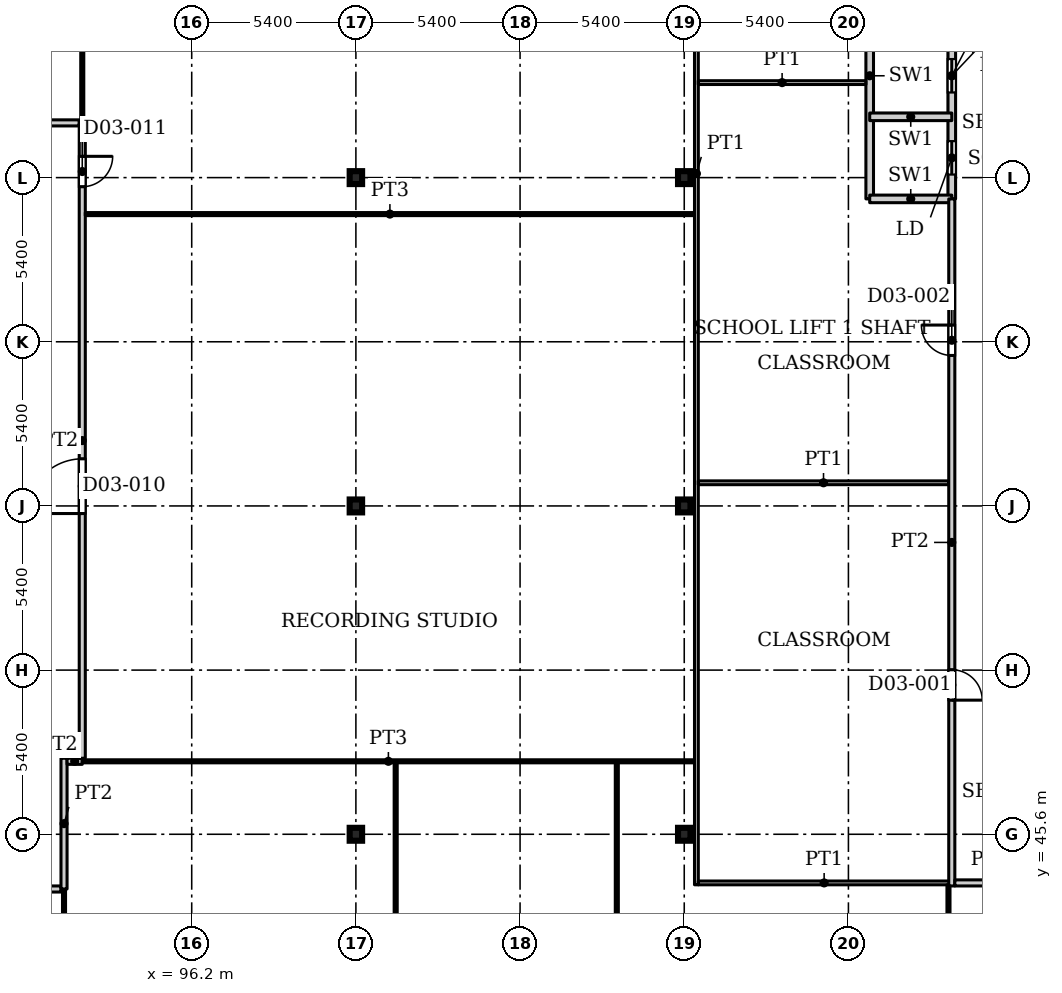
"""IFC4 building model, lengths in metres.
Left out: names, types, materials, properties, quantities, classifications, styles, units other than length and angle.
Written with IfcOpenShell. Run it as: python <this file> out.ifc"""

import sys

from ifc_helpers import new_model, si_unit, direction, frame, frame_2d, origin, origin_2d, place, context, subcontext, project, spatial, rectangle, i_section, extrude, source, transform, mapped, element, fill, save


model = new_model("IFC4")
c1 = context("Model", 3, precision=1e-05, world=origin(), true_north=direction((0.0, 1.0)))
c2 = subcontext(c1, "Body", "Model", "MODEL_VIEW")
j1 = project(units=[si_unit("LENGTHUNIT", "METRE"), si_unit("PLANEANGLEUNIT", "RADIAN")], contexts=[c1])
p1 = place(None, origin())
s1 = spatial("IfcSite", under=j1, at=p1, CompositionType="ELEMENT")
p2 = place(p1, origin())
s2 = spatial("IfcBuilding", under=s1, at=p2, CompositionType="ELEMENT")
p3 = place(p2, frame((0.0, 0.0, 17.0)))
s3 = spatial("IfcBuildingStorey", under=s2, at=p3, CompositionType="ELEMENT", Elevation=17.0)
for number, where, z_axis, x_axis in (
    (1, (101.6, 45.6, 0.0), (0.0, 0.0, 1.0), (1.0, 0.0, 0.0)),
    (2, (112.4, 45.6, 0.0), (0.0, 0.0, 1.0), (1.0, 0.0, 0.0)),
    (3, (101.6, 56.4, 0.0), (0.0, 0.0, 1.0), (1.0, 0.0, 0.0)),
    (4, (112.4, 56.4, 0.0), (0.0, 0.0, 1.0), (1.0, 0.0, 0.0)),
    (5, (101.6, 67.2, 0.0), (0.0, 0.0, 1.0), (1.0, 0.0, 0.0)),
    (6, (112.4, 67.2, 0.0), (0.0, 0.0, 1.0), (1.0, 0.0, 0.0)),
):
    element("IfcColumn", number, at=place(p3, frame(where, z_axis=z_axis, x_axis=x_axis)), inside=s3, PredefinedType="COLUMN", context=c2, shape_type="SweptSolid", body=[
        extrude(i_section(OverallWidth=0.409, OverallDepth=0.425, WebThickness=0.033, FlangeThickness=0.052, FilletRadius=0.013, at=origin_2d()), origin(), (0.0, 0.0, 1.0), 4.5),
    ])
p4 = place(p3, frame((118.5, 66.5, 0.0), z_axis=(0.0, 0.0, 1.0), x_axis=(0.0, 1.0, 0.0)))
e7 = element("IfcWall", 7, at=p4, inside=s3, PredefinedType="PARTITIONING", context=c2, shape_type="SweptSolid", body=[
    extrude(rectangle(XDim=8.1, YDim=0.25, at=frame_2d((4.05, 0.0))), origin(), (0.0, 0.0, 1.0), 4.5),
])
p5 = place(p3, frame((121.2, 66.5, 0.0), z_axis=(0.0, 0.0, 1.0), x_axis=(0.0, 1.0, 0.0)))
e8 = element("IfcWall", 8, at=p5, inside=s3, PredefinedType="PARTITIONING", context=c2, shape_type="SweptSolid", body=[
    extrude(rectangle(XDim=8.1, YDim=0.25, at=frame_2d((4.05, 0.0))), origin(), (0.0, 0.0, 1.0), 4.5),
])
p6 = place(p5, frame((0.8, 0.0, 0.0)))
e9 = element("IfcOpeningElement", 9, at=p6, cuts=e8, PredefinedType="OPENING", context=c2, shape_type="SweptSolid", body=[
    extrude(rectangle(XDim=1.1, YDim=2.2, at=frame_2d((0.55, 1.1))), frame((0.0, 0.135, 0.0), z_axis=(0.0, -1.0, 0.0), x_axis=(1.0, 0.0, 0.0)), (0.0, 0.0, 1.0), 0.27),
])
p7 = place(p5, frame((3.5, 0.0, 0.0)))
e10 = element("IfcOpeningElement", 10, at=p7, cuts=e8, PredefinedType="OPENING", context=c2, shape_type="SweptSolid", body=[
    extrude(rectangle(XDim=1.1, YDim=2.2, at=frame_2d((0.55, 1.1))), frame((0.0, 0.135, 0.0), z_axis=(0.0, -1.0, 0.0), x_axis=(1.0, 0.0, 0.0)), (0.0, 0.0, 1.0), 0.27),
])
p8 = place(p5, frame((6.2, 0.0, 0.0)))
e11 = element("IfcOpeningElement", 11, at=p8, cuts=e8, PredefinedType="OPENING", context=c2, shape_type="SweptSolid", body=[
    extrude(rectangle(XDim=1.1, YDim=2.2, at=frame_2d((0.55, 1.1))), frame((0.0, 0.135, 0.0), z_axis=(0.0, -1.0, 0.0), x_axis=(1.0, 0.0, 0.0)), (0.0, 0.0, 1.0), 0.27),
])
for number, where, z_axis, x_axis in (
    (12, (118.5, 66.5, 0.0), (0.0, 0.0, 1.0), (1.0, 0.0, 0.0)),
    (13, (118.5, 69.2, 0.0), (0.0, 0.0, 1.0), (1.0, 0.0, 0.0)),
):
    element("IfcWall", number, at=place(p3, frame(where, z_axis=z_axis, x_axis=x_axis)), inside=s3, PredefinedType="PARTITIONING", context=c2, shape_type="SweptSolid", body=[
        extrude(rectangle(XDim=2.7, YDim=0.25, at=frame_2d((1.35, 0.0))), origin(), (0.0, 0.0, 1.0), 4.5),
    ])
p9 = place(p3, frame((67.5, 43.8, 0.0), z_axis=(0.0, 0.0, 1.0), x_axis=(1.0, 0.0, 0.0)))
e14 = element("IfcWall", 14, at=p9, inside=s3, PredefinedType="PARTITIONING", context=c2, shape_type="SweptSolid", body=[
    extrude(rectangle(XDim=24.4, YDim=0.2, at=frame_2d((12.2, 0.0))), origin(), (0.0, 0.0, 1.0), 4.18),
])
p10 = place(p9, frame((11.3, 0.0, 0.0)))
e15 = element("IfcOpeningElement", 15, at=p10, cuts=e14, PredefinedType="OPENING", context=c2, shape_type="SweptSolid", body=[
    extrude(rectangle(XDim=1.8, YDim=2.1, at=frame_2d((0.9, 1.05))), frame((0.0, 0.11, 0.0), z_axis=(0.0, -1.0, 0.0), x_axis=(1.0, 0.0, 0.0)), (0.0, 0.0, 1.0), 0.22),
])
p11 = place(p3, frame((67.5, 69.0, 0.0), z_axis=(0.0, 0.0, 1.0), x_axis=(1.0, 0.0, 0.0)))
e16 = element("IfcWall", 16, at=p11, inside=s3, PredefinedType="PARTITIONING", context=c2, shape_type="SweptSolid", body=[
    extrude(rectangle(XDim=25.0, YDim=0.2, at=frame_2d((12.5, 0.0))), origin(), (0.0, 0.0, 1.0), 4.18),
])
p12 = place(p11, frame((11.4, 0.0, 0.0)))
e17 = element("IfcOpeningElement", 17, at=p12, cuts=e16, PredefinedType="OPENING", context=c2, shape_type="SweptSolid", body=[
    extrude(rectangle(XDim=2.0, YDim=2.1, at=frame_2d((1.0, 1.05))), frame((0.0, 0.11, 0.0), z_axis=(0.0, -1.0, 0.0), x_axis=(1.0, 0.0, 0.0)), (0.0, 0.0, 1.0), 0.22),
])
p13 = place(p11, frame((4.3, 0.0, 0.0)))
e18 = element("IfcOpeningElement", 18, at=p13, cuts=e16, PredefinedType="OPENING", context=c2, shape_type="SweptSolid", body=[
    extrude(rectangle(XDim=1.8, YDim=2.1, at=frame_2d((0.9, 1.05))), frame((0.0, 0.11, 0.0), z_axis=(0.0, -1.0, 0.0), x_axis=(1.0, 0.0, 0.0)), (0.0, 0.0, 1.0), 0.22),
])
p14 = place(p11, frame((18.9, 0.0, 0.0)))
e19 = element("IfcOpeningElement", 19, at=p14, cuts=e16, PredefinedType="OPENING", context=c2, shape_type="SweptSolid", body=[
    extrude(rectangle(XDim=1.8, YDim=2.1, at=frame_2d((0.9, 1.05))), frame((0.0, 0.11, 0.0), z_axis=(0.0, -1.0, 0.0), x_axis=(1.0, 0.0, 0.0)), (0.0, 0.0, 1.0), 0.22),
])
p15 = place(p3, frame((92.0, 35.2, 0.0), z_axis=(0.0, 0.0, 1.0), x_axis=(0.0, 1.0, 0.0)))
e20 = element("IfcWall", 20, at=p15, inside=s3, PredefinedType="PARTITIONING", context=c2, shape_type="SweptSolid", body=[
    extrude(rectangle(XDim=8.6, YDim=0.1, at=frame_2d((4.3, 0.0))), origin(), (0.0, 0.0, 1.0), 4.18),
])
p16 = place(p3, frame((92.0, 43.8, 0.0), z_axis=(0.0, 0.0, 1.0), x_axis=(0.0, 1.0, 0.0)))
e21 = element("IfcWall", 21, at=p16, inside=s3, PredefinedType="PARTITIONING", context=c2, shape_type="SweptSolid", body=[
    extrude(rectangle(XDim=4.3, YDim=0.2, at=frame_2d((2.15, 0.0))), origin(), (0.0, 0.0, 1.0), 4.18),
])
p17 = place(p3, frame((92.1, 48.0, 0.0), z_axis=(0.0, 0.0, 1.0), x_axis=(1.0, 0.0, 0.0)))
e22 = element("IfcWall", 22, at=p17, inside=s3, PredefinedType="PARTITIONING", context=c2, shape_type="SweptSolid", body=[
    extrude(rectangle(XDim=0.5, YDim=0.2, at=frame_2d((0.25, 0.0))), origin(), (0.0, 0.0, 1.0), 4.18),
])
p18 = place(p3, frame((92.6, 48.0, 0.0), z_axis=(0.0, 0.0, 1.0), x_axis=(1.0, 0.0, 0.0)))
e23 = element("IfcWall", 23, at=p18, inside=s3, PredefinedType="PARTITIONING", context=c2, shape_type="SweptSolid", body=[
    extrude(rectangle(XDim=20.138, YDim=0.1, at=frame_2d((10.069, 0.0))), origin(), (0.0, 0.0, 1.0), 4.18),
])
p19 = place(p3, frame((92.6, 48.1, 0.0), z_axis=(0.0, 0.0, 1.0), x_axis=(0.0, 1.0, 0.0)))
e24 = element("IfcWall", 24, at=p19, inside=s3, PredefinedType="PARTITIONING", context=c2, shape_type="SweptSolid", body=[
    extrude(rectangle(XDim=20.9, YDim=0.2, at=frame_2d((10.45, 0.0))), origin(), (0.0, 0.0, 1.0), 4.18),
])
p20 = place(p19, frame((8.05, 0.0, 0.0)))
e25 = element("IfcOpeningElement", 25, at=p20, cuts=e24, PredefinedType="OPENING", context=c2, shape_type="SweptSolid", body=[
    extrude(rectangle(XDim=1.8, YDim=2.1, at=frame_2d((0.9, 1.05))), frame((0.0, 0.11, 0.0), z_axis=(0.0, -1.0, 0.0), x_axis=(1.0, 0.0, 0.0)), (0.0, 0.0, 1.0), 0.22),
])
p21 = place(p19, frame((18.8, 0.0, 0.0)))
e26 = element("IfcOpeningElement", 26, at=p21, cuts=e24, PredefinedType="OPENING", context=c2, shape_type="SweptSolid", body=[
    extrude(rectangle(XDim=1.0, YDim=2.1, at=frame_2d((0.5, 1.05))), frame((0.0, 0.11, 0.0), z_axis=(0.0, -1.0, 0.0), x_axis=(1.0, 0.0, 0.0)), (0.0, 0.0, 1.0), 0.22),
])
p22 = place(p3, frame((92.6, 69.0, 0.0), z_axis=(0.0, 0.0, 1.0), x_axis=(0.0, 1.0, 0.0)))
e27 = element("IfcWall", 27, at=p22, inside=s3, PredefinedType="PARTITIONING", context=c2, shape_type="SweptSolid", body=[
    extrude(rectangle(XDim=21.738, YDim=0.1, at=frame_2d((10.869, 0.0))), origin(), (0.0, 0.0, 1.0), 4.18),
])
p23 = place(p3, frame((92.7, 66.0, 0.0), z_axis=(0.0, 0.0, 1.0), x_axis=(1.0, 0.0, 0.0)))
e28 = element("IfcWall", 28, at=p23, inside=s3, PredefinedType="PARTITIONING", context=c2, shape_type="SweptSolid", body=[
    extrude(rectangle(XDim=20.038, YDim=0.1, at=frame_2d((10.019, 0.0))), origin(), (0.0, 0.0, 1.0), 4.18),
])
for number, where, z_axis, x_axis in (
    (29, (102.909, 35.3, 0.0), (0.0, 0.0, 1.0), (0.0, 1.0, 0.0)),
    (30, (110.182, 35.3, 0.0), (0.0, 0.0, 1.0), (0.0, 1.0, 0.0)),
):
    element("IfcWall", number, at=place(p3, frame(where, z_axis=z_axis, x_axis=x_axis)), inside=s3, PredefinedType="PARTITIONING", context=c2, shape_type="SweptSolid", body=[
        extrude(rectangle(XDim=12.65, YDim=0.1, at=frame_2d((6.325, 0.0))), origin(), (0.0, 0.0, 1.0), 4.18),
    ])
p24 = place(p3, frame((112.8, 43.938, 0.0), z_axis=(0.0, 0.0, 1.0), x_axis=(0.0, 1.0, 0.0)))
e31 = element("IfcWall", 31, at=p24, inside=s3, PredefinedType="PARTITIONING", context=c2, shape_type="SweptSolid", body=[
    extrude(rectangle(XDim=46.787, YDim=0.125, at=frame_2d((23.394, 0.0))), origin(), (0.0, 0.0, 1.0), 4.18),
])
p25 = place(p3, frame((112.862, 44.0, 0.0), z_axis=(0.0, 0.0, 1.0), x_axis=(1.0, 0.0, 0.0)))
e32 = element("IfcWall", 32, at=p25, inside=s3, PredefinedType="PARTITIONING", context=c2, shape_type="SweptSolid", body=[
    extrude(rectangle(XDim=8.279, YDim=0.125, at=frame_2d((4.14, 0.0))), origin(), (0.0, 0.0, 1.0), 4.18),
])
p26 = place(p3, frame((112.862, 57.162, 0.0), z_axis=(0.0, 0.0, 1.0), x_axis=(1.0, 0.0, 0.0)))
e33 = element("IfcWall", 33, at=p26, inside=s3, PredefinedType="PARTITIONING", context=c2, shape_type="SweptSolid", body=[
    extrude(rectangle(XDim=8.238, YDim=0.125, at=frame_2d((4.119, 0.0))), origin(), (0.0, 0.0, 1.0), 4.18),
])
p27 = place(p3, frame((112.862, 70.325, 0.0), z_axis=(0.0, 0.0, 1.0), x_axis=(1.0, 0.0, 0.0)))
e34 = element("IfcWall", 34, at=p27, inside=s3, PredefinedType="PARTITIONING", context=c2, shape_type="SweptSolid", body=[
    extrude(rectangle(XDim=5.514, YDim=0.125, at=frame_2d((2.757, 0.0))), origin(), (0.0, 0.0, 1.0), 4.18),
])
p28 = place(p3, frame((121.091, 35.3, 0.0), z_axis=(0.0, 0.0, 1.0), x_axis=(0.0, 1.0, 0.0)))
e35 = element("IfcWall", 35, at=p28, inside=s3, PredefinedType="PARTITIONING", context=c2, shape_type="SweptSolid", body=[
    extrude(rectangle(XDim=8.638, YDim=0.1, at=frame_2d((4.319, 0.0))), origin(), (0.0, 0.0, 1.0), 4.18),
])
p29 = place(p3, frame((121.2, 43.9, 0.0), z_axis=(0.0, 0.0, 1.0), x_axis=(0.0, 1.0, 0.0)))
e36 = element("IfcWall", 36, at=p29, inside=s3, PredefinedType="PARTITIONING", context=c2, shape_type="SweptSolid", body=[
    extrude(rectangle(XDim=22.6, YDim=0.2, at=frame_2d((11.3, 0.0))), origin(), (0.0, 0.0, 1.0), 4.18),
])
p30 = place(p29, frame((6.112, 0.0, 0.0)))
e37 = element("IfcOpeningElement", 37, at=p30, cuts=e36, PredefinedType="OPENING", context=c2, shape_type="SweptSolid", body=[
    extrude(rectangle(XDim=1.0, YDim=2.1, at=frame_2d((0.5, 1.05))), frame((0.0, 0.11, 0.0), z_axis=(0.0, -1.0, 0.0), x_axis=(1.0, 0.0, 0.0)), (0.0, 0.0, 1.0), 0.22),
])
p31 = place(p29, frame((17.45, 0.0, 0.0)))
e38 = element("IfcOpeningElement", 38, at=p31, cuts=e36, PredefinedType="OPENING", context=c2, shape_type="SweptSolid", body=[
    extrude(rectangle(XDim=1.0, YDim=2.1, at=frame_2d((0.5, 1.05))), frame((0.0, 0.11, 0.0), z_axis=(0.0, -1.0, 0.0), x_axis=(1.0, 0.0, 0.0)), (0.0, 0.0, 1.0), 0.22),
])
p32 = place(p3, frame((121.3, 44.0, 0.0), z_axis=(0.0, 0.0, 1.0), x_axis=(1.0, 0.0, 0.0)))
e39 = element("IfcWall", 39, at=p32, inside=s3, PredefinedType="PARTITIONING", context=c2, shape_type="SweptSolid", body=[
    extrude(rectangle(XDim=2.3, YDim=0.2, at=frame_2d((1.15, 0.0))), origin(), (0.0, 0.0, 1.0), 4.18),
])
m1 = source(origin(), c2, "Body", "SweptSolid", [
    extrude(rectangle(XDim=1.1, YDim=2.2, at=frame_2d((0.55, 1.1))), frame((0.0, 0.025, 0.0), z_axis=(0.0, -1.0, 0.0), x_axis=(1.0, 0.0, 0.0)), (0.0, 0.0, 1.0), 0.05),
])
p33 = place(p6, origin())
e40 = element("IfcDoor", 40, at=p33, inside=s3, OperationType="SLIDING_TO_LEFT", PredefinedType="DOOR", context=c2, shape_type="MappedRepresentation", body=[
    mapped(m1, transform((0.0, 0.0, 0.0), x_axis=(1.0, 0.0, 0.0), y_axis=(0.0, 1.0, 0.0), z_axis=(0.0, 0.0, 1.0), scale=1.0)),
])
fill(e9, e40)
p34 = place(p7, origin())
e41 = element("IfcDoor", 41, at=p34, inside=s3, OperationType="SLIDING_TO_LEFT", PredefinedType="DOOR", context=c2, shape_type="MappedRepresentation", body=[
    mapped(m1, transform((0.0, 0.0, 0.0), x_axis=(1.0, 0.0, 0.0), y_axis=(0.0, 1.0, 0.0), z_axis=(0.0, 0.0, 1.0), scale=1.0)),
])
fill(e10, e41)
m2 = source(origin(), c2, "Body", "SweptSolid", [
    extrude(rectangle(XDim=1.0, YDim=2.1, at=frame_2d((0.5, 1.05))), frame((0.0, 0.025, 0.0), z_axis=(0.0, -1.0, 0.0), x_axis=(1.0, 0.0, 0.0)), (0.0, 0.0, 1.0), 0.05),
])
p35 = place(p30, origin())
e42 = element("IfcDoor", 42, at=p35, inside=s3, OperationType="SINGLE_SWING_RIGHT", PredefinedType="DOOR", context=c2, shape_type="MappedRepresentation", body=[
    mapped(m2, transform((0.0, 0.0, 0.0), x_axis=(1.0, 0.0, 0.0), y_axis=(0.0, 1.0, 0.0), z_axis=(0.0, 0.0, 1.0), scale=1.0)),
])
fill(e37, e42)
p36 = place(p31, origin())
e43 = element("IfcDoor", 43, at=p36, inside=s3, OperationType="SINGLE_SWING_LEFT", PredefinedType="DOOR", context=c2, shape_type="MappedRepresentation", body=[
    mapped(m2, transform((0.0, 0.0, 0.0), x_axis=(1.0, 0.0, 0.0), y_axis=(0.0, 1.0, 0.0), z_axis=(0.0, 0.0, 1.0), scale=1.0)),
])
fill(e38, e43)
m3 = source(origin(), c2, "Body", "SweptSolid", [
    extrude(rectangle(XDim=1.8, YDim=2.1, at=frame_2d((0.9, 1.05))), frame((0.0, 0.025, 0.0), z_axis=(0.0, -1.0, 0.0), x_axis=(1.0, 0.0, 0.0)), (0.0, 0.0, 1.0), 0.05),
])
p37 = place(p20, origin())
e44 = element("IfcDoor", 44, at=p37, inside=s3, OperationType="DOUBLE_DOOR_SINGLE_SWING", PredefinedType="DOOR", context=c2, shape_type="MappedRepresentation", body=[
    mapped(m3, transform((0.0, 0.0, 0.0), x_axis=(1.0, 0.0, 0.0), y_axis=(0.0, 1.0, 0.0), z_axis=(0.0, 0.0, 1.0), scale=1.0)),
])
fill(e25, e44)
p38 = place(p21, origin())
e45 = element("IfcDoor", 45, at=p38, inside=s3, OperationType="SINGLE_SWING_RIGHT", PredefinedType="DOOR", context=c2, shape_type="MappedRepresentation", body=[
    mapped(m2, transform((0.0, 0.0, 0.0), x_axis=(1.0, 0.0, 0.0), y_axis=(0.0, 1.0, 0.0), z_axis=(0.0, 0.0, 1.0), scale=1.0)),
])
fill(e26, e45)
save(model, sys.argv[1])
